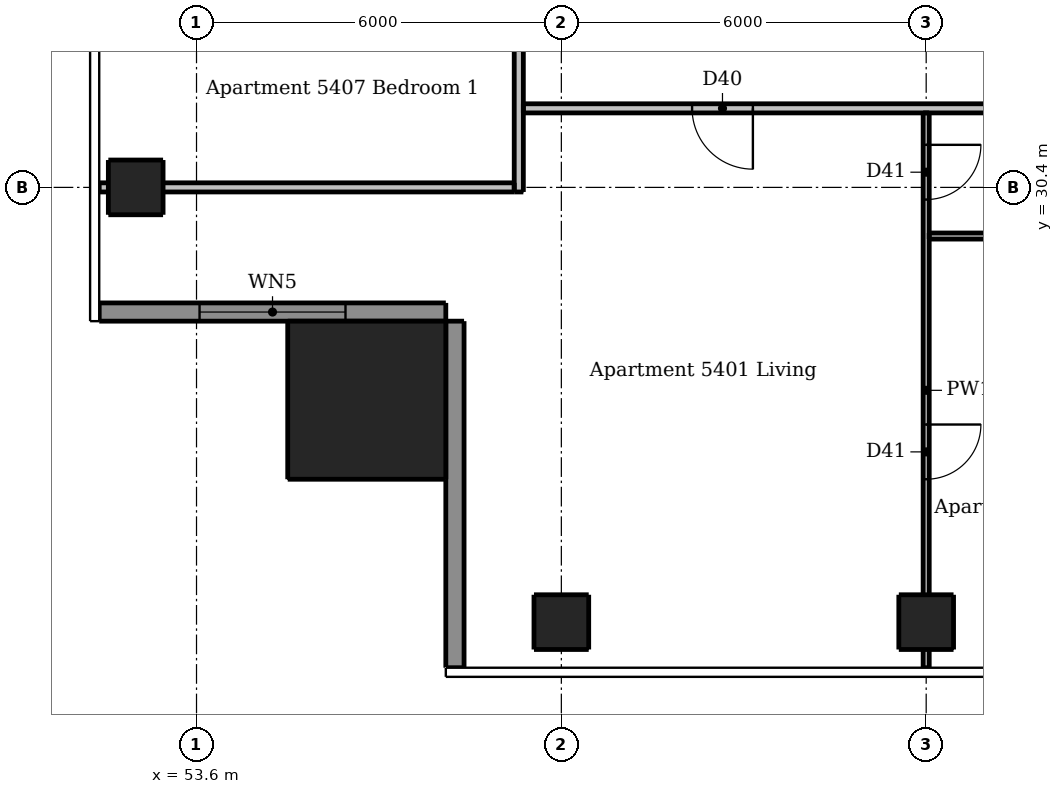
"""IFC4 building model, lengths in metres.
Left out: names, types, materials, properties, quantities, classifications, styles, units other than length and angle.
Written with IfcOpenShell. Run it as: python <this file> out.ifc"""

import sys

from ifc_helpers import new_model, si_unit, direction, frame, frame_2d, origin, origin_2d, place, context, subcontext, project, spatial, rectangle, extrude, element, fill, save


model = new_model("IFC4")
c1 = context("Model", 3, precision=1e-05, world=origin(), true_north=direction((0.0, 1.0)))
c2 = subcontext(c1, "Body", "Model", "MODEL_VIEW")
j1 = project(units=[si_unit("LENGTHUNIT", "METRE"), si_unit("PLANEANGLEUNIT", "RADIAN")], contexts=[c1])
p1 = place(None, origin())
s1 = spatial("IfcSite", under=j1, at=p1, CompositionType="ELEMENT")
p2 = place(p1, origin())
s2 = spatial("IfcBuilding", under=s1, at=p2, CompositionType="ELEMENT")
p3 = place(p2, frame((0.0, 0.0, 203.5)))
s3 = spatial("IfcBuildingStorey", under=s2, at=p3, CompositionType="ELEMENT", Elevation=203.5)
for number, where, z_axis, x_axis in (
    (1, (59.6, 23.25, 0.0), (0.0, 0.0, 1.0), (1.0, 0.0, 0.0)),
    (2, (65.6, 23.25, 0.0), (0.0, 0.0, 1.0), (1.0, 0.0, 0.0)),
    (3, (52.6, 30.4, 0.0), (0.0, 0.0, 1.0), (1.0, 0.0, 0.0)),
):
    element("IfcColumn", number, at=place(p3, frame(where, z_axis=z_axis, x_axis=x_axis)), inside=s3, PredefinedType="COLUMN", context=c2, shape_type="SweptSolid", body=[
        extrude(rectangle(XDim=0.9, YDim=0.9, at=origin_2d()), origin(), (0.0, 0.0, 1.0), 3.05),
    ])
p4 = place(p3, frame((56.4, 26.9, 0.0), z_axis=(0.0, 0.0, 1.0), x_axis=(1.0, 0.0, 0.0)))
e4 = element("IfcColumn", 4, at=p4, inside=s3, PredefinedType="COLUMN", context=c2, shape_type="SweptSolid", body=[
    extrude(rectangle(XDim=2.6, YDim=2.6, at=origin_2d()), origin(), (0.0, 0.0, 1.0), 3.3),
])
p5 = place(p3, frame((52.0, 28.35, 0.0), z_axis=(0.0, 0.0, 1.0), x_axis=(1.0, 0.0, 0.0)))
e5 = element("IfcWall", 5, at=p5, inside=s3, PredefinedType="SOLIDWALL", context=c2, shape_type="SweptSolid", body=[
    extrude(rectangle(XDim=5.7, YDim=0.3, at=frame_2d((2.85, 0.0))), origin(), (0.0, 0.0, 1.0), 3.05),
])
p6 = place(p5, frame((1.65, 0.0, 0.15)))
e6 = element("IfcOpeningElement", 6, at=p6, cuts=e5, PredefinedType="OPENING", context=c2, shape_type="SweptSolid", body=[
    extrude(rectangle(XDim=2.4, YDim=2.1, at=frame_2d((1.2, 1.05))), frame((0.0, 0.16, 0.0), z_axis=(0.0, -1.0, 0.0), x_axis=(1.0, 0.0, 0.0)), (0.0, 0.0, 1.0), 0.32),
])
p7 = place(p3, frame((57.85, 28.2, 0.0), z_axis=(0.0, 0.0, 1.0), x_axis=(0.0, -1.0, 0.0)))
e7 = element("IfcWall", 7, at=p7, inside=s3, PredefinedType="SOLIDWALL", context=c2, shape_type="SweptSolid", body=[
    extrude(rectangle(XDim=5.7, YDim=0.3, at=frame_2d((2.85, 0.0))), origin(), (0.0, 0.0, 1.0), 3.05),
])
p8 = place(p3, frame((65.6, 31.625, 0.0), z_axis=(0.0, 0.0, 1.0), x_axis=(0.0, -1.0, 0.0)))
e8 = element("IfcWall", 8, at=p8, inside=s3, PredefinedType="PARTITIONING", context=c2, shape_type="SweptSolid", body=[
    extrude(rectangle(XDim=9.125, YDim=0.1, at=frame_2d((4.562, 0.0))), origin(), (0.0, 0.0, 1.0), 2.516),
])
p9 = place(p8, frame((0.525, 0.0, 0.0)))
e9 = element("IfcOpeningElement", 9, at=p9, cuts=e8, PredefinedType="OPENING", context=c2, shape_type="SweptSolid", body=[
    extrude(rectangle(XDim=0.9, YDim=2.1, at=frame_2d((0.45, 1.05))), frame((0.0, 0.06, 0.0), z_axis=(0.0, -1.0, 0.0), x_axis=(1.0, 0.0, 0.0)), (0.0, 0.0, 1.0), 0.12),
])
p10 = place(p8, frame((5.125, 0.0, 0.0)))
e10 = element("IfcOpeningElement", 10, at=p10, cuts=e8, PredefinedType="OPENING", context=c2, shape_type="SweptSolid", body=[
    extrude(rectangle(XDim=0.9, YDim=2.1, at=frame_2d((0.45, 1.05))), frame((0.0, 0.06, 0.0), z_axis=(0.0, -1.0, 0.0), x_axis=(1.0, 0.0, 0.0)), (0.0, 0.0, 1.0), 0.12),
])
p11 = place(p3, frame((65.65, 29.6, 0.0), z_axis=(0.0, 0.0, 1.0), x_axis=(1.0, 0.0, 0.0)))
e11 = element("IfcWall", 11, at=p11, inside=s3, PredefinedType="PARTITIONING", context=c2, shape_type="SweptSolid", body=[
    extrude(rectangle(XDim=5.875, YDim=0.1, at=frame_2d((2.938, 0.0))), origin(), (0.0, 0.0, 1.0), 3.05),
])
p12 = place(p11, frame((3.75, 0.0, 0.0)))
e12 = element("IfcOpeningElement", 12, at=p12, cuts=e11, PredefinedType="OPENING", context=c2, shape_type="SweptSolid", body=[
    extrude(rectangle(XDim=0.8, YDim=2.1, at=frame_2d((0.4, 1.05))), frame((0.0, 0.06, 0.0), z_axis=(0.0, -1.0, 0.0), x_axis=(1.0, 0.0, 0.0)), (0.0, 0.0, 1.0), 0.12),
])
p13 = place(p3, frame((58.9, 30.325, 0.0), z_axis=(0.0, 0.0, 1.0), x_axis=(0.0, 1.0, 0.0)))
e13 = element("IfcWall", 13, at=p13, inside=s3, PredefinedType="PARTITIONING", context=c2, shape_type="SweptSolid", body=[
    extrude(rectangle(XDim=30.85, YDim=0.15, at=frame_2d((15.425, 0.0))), origin(), (0.0, 0.0, 1.0), 3.05),
])
p14 = place(p13, frame((7.375, 0.0, 0.0)))
e14 = element("IfcOpeningElement", 14, at=p14, cuts=e13, PredefinedType="OPENING", context=c2, shape_type="SweptSolid", body=[
    extrude(rectangle(XDim=1.0, YDim=2.1, at=frame_2d((0.5, 1.05))), frame((0.0, 0.085, 0.0), z_axis=(0.0, -1.0, 0.0), x_axis=(1.0, 0.0, 0.0)), (0.0, 0.0, 1.0), 0.17),
])
p15 = place(p13, frame((26.925, 0.0, 0.0)))
e15 = element("IfcOpeningElement", 15, at=p15, cuts=e13, PredefinedType="OPENING", context=c2, shape_type="SweptSolid", body=[
    extrude(rectangle(XDim=1.0, YDim=2.1, at=frame_2d((0.5, 1.05))), frame((0.0, 0.085, 0.0), z_axis=(0.0, -1.0, 0.0), x_axis=(1.0, 0.0, 0.0)), (0.0, 0.0, 1.0), 0.17),
])
p16 = place(p3, frame((89.525, 31.7, 0.0), z_axis=(0.0, 0.0, 1.0), x_axis=(-1.0, 0.0, 0.0)))
e16 = element("IfcWall", 16, at=p16, inside=s3, PredefinedType="PARTITIONING", context=c2, shape_type="SweptSolid", body=[
    extrude(rectangle(XDim=30.55, YDim=0.15, at=frame_2d((15.275, 0.0))), origin(), (0.0, 0.0, 1.0), 3.05),
])
p17 = place(p16, frame((26.775, 0.0, 0.0)))
e17 = element("IfcOpeningElement", 17, at=p17, cuts=e16, PredefinedType="OPENING", context=c2, shape_type="SweptSolid", body=[
    extrude(rectangle(XDim=1.0, YDim=2.1, at=frame_2d((0.5, 1.05))), frame((0.0, 0.085, 0.0), z_axis=(0.0, -1.0, 0.0), x_axis=(1.0, 0.0, 0.0)), (0.0, 0.0, 1.0), 0.17),
])
p18 = place(p16, frame((9.075, 0.0, 0.0)))
e18 = element("IfcOpeningElement", 18, at=p18, cuts=e16, PredefinedType="OPENING", context=c2, shape_type="SweptSolid", body=[
    extrude(rectangle(XDim=1.0, YDim=2.1, at=frame_2d((0.5, 1.05))), frame((0.0, 0.085, 0.0), z_axis=(0.0, -1.0, 0.0), x_axis=(1.0, 0.0, 0.0)), (0.0, 0.0, 1.0), 0.17),
])
p19 = place(p3, frame((52.0, 30.4, 0.0), z_axis=(0.0, 0.0, 1.0), x_axis=(1.0, 0.0, 0.0)))
e19 = element("IfcWall", 19, at=p19, inside=s3, PredefinedType="PARTITIONING", context=c2, shape_type="SweptSolid", body=[
    extrude(rectangle(XDim=6.825, YDim=0.15, at=frame_2d((3.413, 0.0))), origin(), (0.0, 0.0, 1.0), 2.647),
])
p20 = place(p6, origin())
e20 = element("IfcWindow", 20, at=p20, inside=s3, PartitioningType="DOUBLE_PANEL_VERTICAL", PredefinedType="WINDOW", context=c2, shape_type="SweptSolid", body=[
    extrude(rectangle(XDim=2.4, YDim=2.1, at=frame_2d((1.2, 1.05))), frame((0.0, 0.03, 0.0), z_axis=(0.0, -1.0, 0.0), x_axis=(1.0, 0.0, 0.0)), (0.0, 0.0, 1.0), 0.06),
])
fill(e6, e20)
p21 = place(p17, origin())
e21 = element("IfcDoor", 21, at=p21, inside=s3, OperationType="SINGLE_SWING_LEFT", PredefinedType="DOOR", context=c2, shape_type="SweptSolid", body=[
    extrude(rectangle(XDim=1.0, YDim=2.1, at=frame_2d((0.5, 1.05))), frame((0.0, 0.025, 0.0), z_axis=(0.0, -1.0, 0.0), x_axis=(1.0, 0.0, 0.0)), (0.0, 0.0, 1.0), 0.05),
])
fill(e17, e21)
p22 = place(p9, origin())
e22 = element("IfcDoor", 22, at=p22, inside=s3, OperationType="SINGLE_SWING_LEFT", PredefinedType="DOOR", context=c2, shape_type="SweptSolid", body=[
    extrude(rectangle(XDim=0.9, YDim=2.1, at=frame_2d((0.45, 1.05))), frame((0.0, 0.025, 0.0), z_axis=(0.0, -1.0, 0.0), x_axis=(1.0, 0.0, 0.0)), (0.0, 0.0, 1.0), 0.05),
])
fill(e9, e22)
p23 = place(p10, origin())
e23 = element("IfcDoor", 23, at=p23, inside=s3, OperationType="SINGLE_SWING_LEFT", PredefinedType="DOOR", context=c2, shape_type="SweptSolid", body=[
    extrude(rectangle(XDim=0.9, YDim=2.1, at=frame_2d((0.45, 1.05))), frame((0.0, 0.025, 0.0), z_axis=(0.0, -1.0, 0.0), x_axis=(1.0, 0.0, 0.0)), (0.0, 0.0, 1.0), 0.05),
])
fill(e10, e23)
save(model, sys.argv[1])
